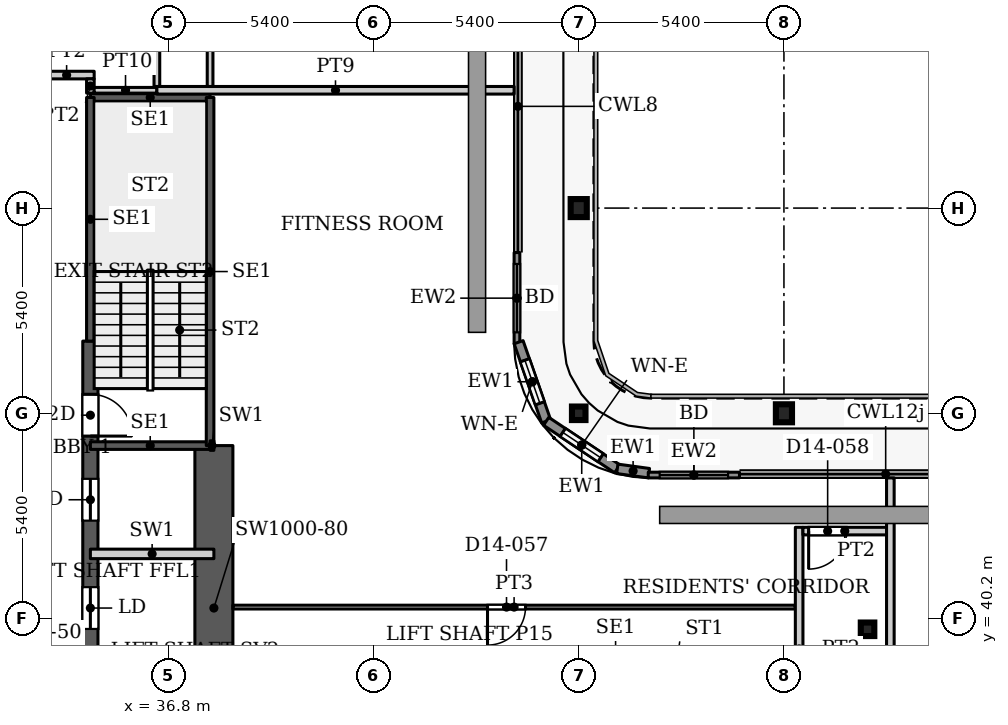
"""IFC4 building model, lengths in metres.
Left out: names, types, materials, properties, quantities, classifications, styles, units other than length and angle.
Written with IfcOpenShell. Run it as: python <this file> out.ifc"""

import sys

from ifc_helpers import new_model, si_unit, direction, frame, frame_2d, origin, origin_2d, place, context, subcontext, project, spatial, rectangle, hollow_rectangle, i_section, extrude, source, transform, mapped, element, fill, save


model = new_model("IFC4")
c1 = context("Model", 3, precision=1e-05, world=origin(), true_north=direction((0.0, 1.0)))
c2 = subcontext(c1, "Body", "Model", "MODEL_VIEW")
j1 = project(units=[si_unit("LENGTHUNIT", "METRE"), si_unit("PLANEANGLEUNIT", "RADIAN")], contexts=[c1])
p1 = place(None, origin())
s1 = spatial("IfcSite", under=j1, at=p1, CompositionType="ELEMENT")
p2 = place(p1, origin())
s2 = spatial("IfcBuilding", under=s1, at=p2, CompositionType="ELEMENT")
p3 = place(p2, frame((0.0, 0.0, 61.7)))
s3 = spatial("IfcBuildingStorey", under=s2, at=p3, CompositionType="ELEMENT", Elevation=61.7)
for number, where, z_axis, x_axis in (
    (1, (53.0, 45.6, 0.0), (0.0, 0.0, 1.0), (1.0, 0.0, 0.0)),
    (2, (47.6, 51.0, 0.0), (0.0, 0.0, 1.0), (1.0, 0.0, 0.0)),
):
    element("IfcColumn", number, at=place(p3, frame(where, z_axis=z_axis, x_axis=x_axis)), inside=s3, PredefinedType="COLUMN", context=c2, shape_type="SweptSolid", body=[
        extrude(i_section(OverallWidth=0.424, OverallDepth=0.474, WebThickness=0.048, FlangeThickness=0.077, FilletRadius=0.014, at=origin_2d()), origin(), (0.0, 0.0, 1.0), 3.9),
    ])
for number, where, z_axis, x_axis in (
    (3, (55.2, 39.916, 0.0), (0.0, 0.0, 1.0), (1.0, 0.0, 0.0)),
    (4, (47.6, 45.6, 0.0), (0.0, 0.0, 1.0), (1.0, 0.0, 0.0)),
):
    element("IfcColumn", number, at=place(p3, frame(where, z_axis=z_axis, x_axis=x_axis)), inside=s3, PredefinedType="COLUMN", context=c2, shape_type="SweptSolid", body=[
        extrude(hollow_rectangle(XDim=0.356, YDim=0.356, WallThickness=0.016, InnerFilletRadius=0.016, OuterFilletRadius=0.032, at=origin_2d()), origin(), (0.0, 0.0, 1.0), 3.9),
    ])
p4 = place(p3, frame((34.75, 29.05, 0.0), z_axis=(0.0, 0.0, 1.0), x_axis=(0.0, 1.0, 0.0)))
e5 = element("IfcWall", 5, at=p4, inside=s3, PredefinedType="SHEAR", context=c2, shape_type="SweptSolid", body=[
    extrude(rectangle(XDim=18.45, YDim=0.4, at=frame_2d((9.225, 0.0))), origin(), (0.0, 0.0, 1.0), 3.9),
])
p5 = place(p4, frame((8.025, 0.0, 0.0)))
e6 = element("IfcOpeningElement", 6, at=p5, cuts=e5, PredefinedType="OPENING", context=c2, shape_type="SweptSolid", body=[
    extrude(rectangle(XDim=1.1, YDim=2.2, at=frame_2d((0.55, 1.1))), frame((0.0, 0.21, 0.0), z_axis=(0.0, -1.0, 0.0), x_axis=(1.0, 0.0, 0.0)), (0.0, 0.0, 1.0), 0.42),
])
p6 = place(p4, frame((10.875, 0.0, 0.0)))
e7 = element("IfcOpeningElement", 7, at=p6, cuts=e5, PredefinedType="OPENING", context=c2, shape_type="SweptSolid", body=[
    extrude(rectangle(XDim=1.1, YDim=2.2, at=frame_2d((0.55, 1.1))), frame((0.0, 0.21, 0.0), z_axis=(0.0, -1.0, 0.0), x_axis=(1.0, 0.0, 0.0)), (0.0, 0.0, 1.0), 0.42),
])
p7 = place(p4, frame((13.725, 0.0, 0.0)))
e8 = element("IfcOpeningElement", 8, at=p7, cuts=e5, PredefinedType="OPENING", context=c2, shape_type="SweptSolid", body=[
    extrude(rectangle(XDim=1.1, YDim=2.2, at=frame_2d((0.55, 1.1))), frame((0.0, 0.21, 0.0), z_axis=(0.0, -1.0, 0.0), x_axis=(1.0, 0.0, 0.0)), (0.0, 0.0, 1.0), 0.42),
])
p8 = place(p4, frame((15.95, 0.0, 0.0)))
e9 = element("IfcOpeningElement", 9, at=p8, cuts=e5, PredefinedType="OPENING", context=c2, shape_type="SweptSolid", body=[
    extrude(rectangle(XDim=1.1, YDim=2.2, at=frame_2d((0.55, 1.1))), frame((0.0, 0.21, 0.0), z_axis=(0.0, -1.0, 0.0), x_axis=(1.0, 0.0, 0.0)), (0.0, 0.0, 1.0), 0.42),
])
p9 = place(p3, frame((38.0, 36.2, 0.0), z_axis=(0.0, 0.0, 1.0), x_axis=(0.0, 1.0, 0.0)))
e10 = element("IfcWall", 10, at=p9, inside=s3, PredefinedType="SHEAR", context=c2, shape_type="SweptSolid", body=[
    extrude(rectangle(XDim=8.55, YDim=1.0, at=frame_2d((4.275, 0.0))), origin(), (0.0, 0.0, 1.0), 3.9),
])
p10 = place(p3, frame((45.975, 49.83, 0.0), z_axis=(0.0, 0.0, 1.0), x_axis=(0.0, -1.0, 0.0)))
e11 = element("IfcWall", 11, at=p10, inside=s3, PredefinedType="SOLIDWALL", context=c2, shape_type="SweptSolid", body=[
    extrude(rectangle(XDim=2.4, YDim=0.15, at=frame_2d((1.2, 0.0))), origin(), (0.0, 0.0, 1.0), 3.75),
])
p11 = place(p10, frame((0.3, 0.0, 0.0)))
e12 = element("IfcOpeningElement", 12, at=p11, cuts=e11, PredefinedType="OPENING", context=c2, shape_type="SweptSolid", body=[
    extrude(rectangle(XDim=1.8, YDim=2.4, at=frame_2d((0.9, 1.2))), frame((0.0, 0.085, 0.0), z_axis=(0.0, -1.0, 0.0), x_axis=(1.0, 0.0, 0.0)), (0.0, 0.0, 1.0), 0.17),
])
p12 = place(p3, frame((46.018, 47.471, 0.0), z_axis=(0.0, 0.0, 1.0), x_axis=(0.328791208903, -0.944402637093, 0.0)))
e13 = element("IfcWall", 13, at=p12, inside=s3, PredefinedType="SOLIDWALL", context=c2, shape_type="SweptSolid", body=[
    extrude(rectangle(XDim=2.205, YDim=0.25, at=frame_2d((1.102, 0.0))), origin(), (0.0, 0.0, 1.0), 3.75),
])
p13 = place(p12, frame((0.503, 0.0, 0.6)))
e14 = element("IfcOpeningElement", 14, at=p13, cuts=e13, PredefinedType="OPENING", context=c2, shape_type="SweptSolid", body=[
    extrude(rectangle(XDim=1.2, YDim=2.1, at=frame_2d((0.6, 1.05))), frame((0.0, 0.135, 0.0), z_axis=(0.0, -1.0, 0.0), x_axis=(1.0, 0.0, 0.0)), (0.0, 0.0, 1.0), 0.27),
])
p14 = place(p3, frame((46.743, 45.389, 0.0), z_axis=(0.0, 0.0, 1.0), x_axis=(0.831449265529, -0.555600682912, 0.0)))
e15 = element("IfcWall", 15, at=p14, inside=s3, PredefinedType="SOLIDWALL", context=c2, shape_type="SweptSolid", body=[
    extrude(rectangle(XDim=2.251, YDim=0.25, at=frame_2d((1.126, 0.0))), origin(), (0.0, 0.0, 1.0), 3.75),
])
p15 = place(p14, frame((0.525, 0.0, 0.6)))
e16 = element("IfcOpeningElement", 16, at=p15, cuts=e15, PredefinedType="OPENING", context=c2, shape_type="SweptSolid", body=[
    extrude(rectangle(XDim=1.2, YDim=2.1, at=frame_2d((0.6, 1.05))), frame((0.0, 0.135, 0.0), z_axis=(0.0, -1.0, 0.0), x_axis=(1.0, 0.0, 0.0)), (0.0, 0.0, 1.0), 0.27),
])
p16 = place(p3, frame((48.615, 44.138, 0.0), z_axis=(0.0, 0.0, 1.0), x_axis=(0.990741504246, -0.135761819977, 0.0)))
e17 = element("IfcWall", 17, at=p16, inside=s3, PredefinedType="SOLIDWALL", context=c2, shape_type="SweptSolid", body=[
    extrude(rectangle(XDim=0.84, YDim=0.25, at=frame_2d((0.42, 0.0))), origin(), (0.0, 0.0, 1.0), 3.75),
])
p17 = place(p3, frame((49.43, 43.975, 0.0), z_axis=(0.0, 0.0, 1.0), x_axis=(1.0, 0.0, 0.0)))
e18 = element("IfcWall", 18, at=p17, inside=s3, PredefinedType="SOLIDWALL", context=c2, shape_type="SweptSolid", body=[
    extrude(rectangle(XDim=2.4, YDim=0.15, at=frame_2d((1.2, 0.0))), origin(), (0.0, 0.0, 1.0), 3.75),
])
p18 = place(p17, frame((0.3, 0.0, 0.0)))
e19 = element("IfcOpeningElement", 19, at=p18, cuts=e18, PredefinedType="OPENING", context=c2, shape_type="SweptSolid", body=[
    extrude(rectangle(XDim=1.8, YDim=2.4, at=frame_2d((0.9, 1.2))), frame((0.0, 0.085, 0.0), z_axis=(0.0, -1.0, 0.0), x_axis=(1.0, 0.0, 0.0)), (0.0, 0.0, 1.0), 0.17),
])
for number, where, z_axis, x_axis in (
    (20, (34.75, 44.75, 0.0), (0.0, 0.0, 1.0), (1.0, 0.0, 0.0)),
    (21, (34.75, 53.91, 0.0), (0.0, 0.0, 1.0), (1.0, 0.0, 0.0)),
):
    element("IfcWall", number, at=place(p3, frame(where, z_axis=z_axis, x_axis=x_axis)), inside=s3, PredefinedType="SHEAR", context=c2, shape_type="SweptSolid", body=[
        extrude(rectangle(XDim=3.15, YDim=0.2, at=frame_2d((1.575, 0.0))), origin(), (0.0, 0.0, 1.0), 3.9),
    ])
p19 = place(p3, frame((34.75, 47.5, 0.0), z_axis=(0.0, 0.0, 1.0), x_axis=(0.0, 1.0, 0.0)))
e22 = element("IfcWall", 22, at=p19, inside=s3, PredefinedType="SHEAR", context=c2, shape_type="SweptSolid", body=[
    extrude(rectangle(XDim=6.41, YDim=0.2, at=frame_2d((3.205, 0.0))), origin(), (0.0, 0.0, 1.0), 3.9),
])
p20 = place(p3, frame((37.9, 44.75, 0.0), z_axis=(0.0, 0.0, 1.0), x_axis=(0.0, 1.0, 0.0)))
e23 = element("IfcWall", 23, at=p20, inside=s3, PredefinedType="SHEAR", context=c2, shape_type="SweptSolid", body=[
    extrude(rectangle(XDim=9.16, YDim=0.2, at=frame_2d((4.58, 0.0))), origin(), (0.0, 0.0, 1.0), 3.9),
])
p21 = place(p3, frame((34.75, 41.9, 0.0), z_axis=(0.0, 0.0, 1.0), x_axis=(1.0, 0.0, 0.0)))
e24 = element("IfcWall", 24, at=p21, inside=s3, PredefinedType="PARTITIONING", context=c2, shape_type="SweptSolid", body=[
    extrude(rectangle(XDim=3.25, YDim=0.25, at=frame_2d((1.625, 0.0))), origin(), (0.0, 0.0, 1.0), 3.9),
])
p22 = place(p3, frame((37.9, 44.75, 0.0), z_axis=(0.0, 0.0, 1.0), x_axis=(1.0, 0.0, 0.0)))
e25 = element("IfcWall", 25, at=p22, inside=s3, PredefinedType="PARTITIONING", context=c2, shape_type="SweptSolid", body=[
    extrude(rectangle(XDim=0.1, YDim=0.25, at=frame_2d((0.05, 0.0))), origin(), (0.0, 0.0, 1.0), 3.9),
])
p23 = place(p3, frame((33.4, 54.5, 0.0), z_axis=(0.0, 0.0, 1.0), x_axis=(1.0, 0.0, 0.0)))
e26 = element("IfcWall", 26, at=p23, inside=s3, PredefinedType="PARTITIONING", context=c2, shape_type="SweptSolid", body=[
    extrude(rectangle(XDim=1.45, YDim=0.2, at=frame_2d((0.725, 0.0))), origin(), (0.0, 0.0, 1.0), 3.6),
])
p24 = place(p3, frame((34.75, 54.025, 0.0), z_axis=(0.0, 0.0, 1.0), x_axis=(0.0, 1.0, 0.0)))
e27 = element("IfcWall", 27, at=p24, inside=s3, PredefinedType="PARTITIONING", context=c2, shape_type="SweptSolid", body=[
    extrude(rectangle(XDim=0.375, YDim=0.2, at=frame_2d((0.188, 0.0))), origin(), (0.0, 0.0, 1.0), 3.6),
])
p25 = place(p3, frame((34.85, 54.1, 0.0), z_axis=(0.0, 0.0, 1.0), x_axis=(1.0, 0.0, 0.0)))
e28 = element("IfcWall", 28, at=p25, inside=s3, PredefinedType="PARTITIONING", context=c2, shape_type="SweptSolid", body=[
    extrude(rectangle(XDim=1.65, YDim=0.15, at=frame_2d((0.825, 0.0))), origin(), (0.0, 0.0, 1.0), 3.6),
])
p26 = place(p3, frame((36.5, 54.1, 0.0), z_axis=(0.0, 0.0, 1.0), x_axis=(1.0, 0.0, 0.0)))
e29 = element("IfcWall", 29, at=p26, inside=s3, PredefinedType="PARTITIONING", context=c2, shape_type="SweptSolid", body=[
    extrude(rectangle(XDim=9.4, YDim=0.2, at=frame_2d((4.7, 0.0))), origin(), (0.0, 0.0, 1.0), 3.6),
])
p27 = place(p3, frame((36.5, 54.2, 0.0), z_axis=(0.0, 0.0, 1.0), x_axis=(0.0, 1.0, 0.0)))
e30 = element("IfcWall", 30, at=p27, inside=s3, PredefinedType="PARTITIONING", context=c2, shape_type="SweptSolid", body=[
    extrude(rectangle(XDim=2.825, YDim=0.15, at=frame_2d((1.413, 0.0))), origin(), (0.0, 0.0, 1.0), 3.6),
])
p28 = place(p27, frame((1.0, 0.0, 0.0)))
e31 = element("IfcOpeningElement", 31, at=p28, cuts=e30, PredefinedType="OPENING", context=c2, shape_type="SweptSolid", body=[
    extrude(rectangle(XDim=0.8, YDim=2.1, at=frame_2d((0.4, 1.05))), frame((0.0, 0.085, 0.0), z_axis=(0.0, -1.0, 0.0), x_axis=(1.0, 0.0, 0.0)), (0.0, 0.0, 1.0), 0.17),
])
p29 = place(p3, frame((37.9, 54.2, 0.0), z_axis=(0.0, 0.0, 1.0), x_axis=(0.0, 1.0, 0.0)))
e32 = element("IfcWall", 32, at=p29, inside=s3, PredefinedType="PARTITIONING", context=c2, shape_type="SweptSolid", body=[
    extrude(rectangle(XDim=25.05, YDim=0.15, at=frame_2d((12.525, 0.0))), origin(), (0.0, 0.0, 1.0), 3.6),
])
p30 = place(p29, frame((5.6, 0.0, 0.0)))
e33 = element("IfcOpeningElement", 33, at=p30, cuts=e32, PredefinedType="OPENING", context=c2, shape_type="SweptSolid", body=[
    extrude(rectangle(XDim=0.9, YDim=2.1, at=frame_2d((0.45, 1.05))), frame((0.0, 0.085, 0.0), z_axis=(0.0, -1.0, 0.0), x_axis=(1.0, 0.0, 0.0)), (0.0, 0.0, 1.0), 0.17),
])
p31 = place(p29, frame((14.9, 0.0, 0.0)))
e34 = element("IfcOpeningElement", 34, at=p31, cuts=e32, PredefinedType="OPENING", context=c2, shape_type="SweptSolid", body=[
    extrude(rectangle(XDim=0.9, YDim=2.1, at=frame_2d((0.45, 1.05))), frame((0.0, 0.085, 0.0), z_axis=(0.0, -1.0, 0.0), x_axis=(1.0, 0.0, 0.0)), (0.0, 0.0, 1.0), 0.17),
])
p32 = place(p29, frame((18.65, 0.0, 0.0)))
e35 = element("IfcOpeningElement", 35, at=p32, cuts=e32, PredefinedType="OPENING", context=c2, shape_type="SweptSolid", body=[
    extrude(rectangle(XDim=0.9, YDim=2.1, at=frame_2d((0.45, 1.05))), frame((0.0, 0.085, 0.0), z_axis=(0.0, -1.0, 0.0), x_axis=(1.0, 0.0, 0.0)), (0.0, 0.0, 1.0), 0.17),
])
p33 = place(p29, frame((22.5, 0.0, 0.0)))
e36 = element("IfcOpeningElement", 36, at=p33, cuts=e32, PredefinedType="OPENING", context=c2, shape_type="SweptSolid", body=[
    extrude(rectangle(XDim=1.0, YDim=2.1, at=frame_2d((0.5, 1.05))), frame((0.0, 0.085, 0.0), z_axis=(0.0, -1.0, 0.0), x_axis=(1.0, 0.0, 0.0)), (0.0, 0.0, 1.0), 0.17),
])
p34 = place(p29, frame((1.2, 0.0, 0.0)))
e37 = element("IfcOpeningElement", 37, at=p34, cuts=e32, PredefinedType="OPENING", context=c2, shape_type="SweptSolid", body=[
    extrude(rectangle(XDim=1.6, YDim=2.1, at=frame_2d((0.8, 1.05))), frame((0.0, 0.085, 0.0), z_axis=(0.0, -1.0, 0.0), x_axis=(1.0, 0.0, 0.0)), (0.0, 0.0, 1.0), 0.17),
])
p35 = place(p29, frame((11.3, 0.0, 0.0)))
e38 = element("IfcOpeningElement", 38, at=p35, cuts=e32, PredefinedType="OPENING", context=c2, shape_type="SweptSolid", body=[
    extrude(rectangle(XDim=0.9, YDim=2.1, at=frame_2d((0.45, 1.05))), frame((0.0, 0.085, 0.0), z_axis=(0.0, -1.0, 0.0), x_axis=(1.0, 0.0, 0.0)), (0.0, 0.0, 1.0), 0.17),
])
p36 = place(p3, frame((38.499, 40.5, 0.0), z_axis=(0.0, 0.0, 1.0), x_axis=(1.0, 0.0, 0.0)))
e39 = element("IfcWall", 39, at=p36, inside=s3, PredefinedType="PARTITIONING", context=c2, shape_type="SweptSolid", body=[
    extrude(rectangle(XDim=14.801, YDim=0.1, at=frame_2d((7.4, 0.0))), origin(), (0.0, 0.0, 1.0), 3.6),
])
p37 = place(p36, frame((6.701, 0.0, 0.0)))
e40 = element("IfcOpeningElement", 40, at=p37, cuts=e39, PredefinedType="OPENING", context=c2, shape_type="SweptSolid", body=[
    extrude(rectangle(XDim=1.0, YDim=2.1, at=frame_2d((0.5, 1.05))), frame((0.0, 0.06, 0.0), z_axis=(0.0, -1.0, 0.0), x_axis=(1.0, 0.0, 0.0)), (0.0, 0.0, 1.0), 0.12),
])
p38 = place(p3, frame((53.4, 36.199, 0.0), z_axis=(0.0, 0.0, 1.0), x_axis=(0.0, 1.0, 0.0)))
e41 = element("IfcWall", 41, at=p38, inside=s3, PredefinedType="PARTITIONING", context=c2, shape_type="SweptSolid", body=[
    extrude(rectangle(XDim=6.401, YDim=0.2, at=frame_2d((3.201, 0.0))), origin(), (0.0, 0.0, 1.0), 3.6),
])
p39 = place(p3, frame((53.5, 42.5, 0.0), z_axis=(0.0, 0.0, 1.0), x_axis=(1.0, 0.0, 0.0)))
e42 = element("IfcWall", 42, at=p39, inside=s3, PredefinedType="PARTITIONING", context=c2, shape_type="SweptSolid", body=[
    extrude(rectangle(XDim=2.2, YDim=0.2, at=frame_2d((1.1, 0.0))), origin(), (0.0, 0.0, 1.0), 3.6),
])
p40 = place(p39, frame((0.15, 0.0, 0.0)))
e43 = element("IfcOpeningElement", 43, at=p40, cuts=e42, PredefinedType="OPENING", context=c2, shape_type="SweptSolid", body=[
    extrude(rectangle(XDim=1.0, YDim=2.1, at=frame_2d((0.5, 1.05))), frame((0.0, 0.11, 0.0), z_axis=(0.0, -1.0, 0.0), x_axis=(1.0, 0.0, 0.0)), (0.0, 0.0, 1.0), 0.22),
])
p41 = place(p3, frame((55.8, 30.4, 0.0), z_axis=(0.0, 0.0, 1.0), x_axis=(0.0, 1.0, 0.0)))
e44 = element("IfcWall", 44, at=p41, inside=s3, PredefinedType="PARTITIONING", context=c2, shape_type="SweptSolid", body=[
    extrude(rectangle(XDim=13.5, YDim=0.2, at=frame_2d((6.75, 0.0))), origin(), (0.0, 0.0, 1.0), 3.6),
])
m1 = source(origin(), c2, "Body", "SweptSolid", [
    extrude(rectangle(XDim=1.8, YDim=2.4, at=frame_2d((0.9, 1.2))), frame((0.0, 0.025, 0.0), z_axis=(0.0, -1.0, 0.0), x_axis=(1.0, 0.0, 0.0)), (0.0, 0.0, 1.0), 0.05),
])
p42 = place(p11, origin())
e45 = element("IfcDoor", 45, at=p42, inside=s3, OperationType="SLIDING_TO_LEFT", PredefinedType="DOOR", context=c2, shape_type="MappedRepresentation", body=[
    mapped(m1, transform((0.0, 0.0, 0.0), x_axis=(1.0, 0.0, 0.0), y_axis=(0.0, 1.0, 0.0), z_axis=(0.0, 0.0, 1.0), scale=1.0)),
])
fill(e12, e45)
m2 = source(origin(), c2, "Body", "SweptSolid", [
    extrude(rectangle(XDim=1.2, YDim=2.1, at=frame_2d((0.6, 1.05))), frame((0.0, 0.03, 0.0), z_axis=(0.0, -1.0, 0.0), x_axis=(1.0, 0.0, 0.0)), (0.0, 0.0, 1.0), 0.06),
])
p43 = place(p13, origin())
e46 = element("IfcWindow", 46, at=p43, inside=s3, PartitioningType="SINGLE_PANEL", PredefinedType="WINDOW", context=c2, shape_type="MappedRepresentation", body=[
    mapped(m2, transform((0.0, 0.0, 0.0), x_axis=(1.0, 0.0, 0.0), y_axis=(0.0, 1.0, 0.0), z_axis=(0.0, 0.0, 1.0), scale=1.0)),
])
fill(e14, e46)
p44 = place(p15, origin())
e47 = element("IfcWindow", 47, at=p44, inside=s3, PartitioningType="SINGLE_PANEL", PredefinedType="WINDOW", context=c2, shape_type="MappedRepresentation", body=[
    mapped(m2, transform((0.0, 0.0, 0.0), x_axis=(1.0, 0.0, 0.0), y_axis=(0.0, 1.0, 0.0), z_axis=(0.0, 0.0, 1.0), scale=1.0)),
])
fill(e16, e47)
p45 = place(p18, origin())
e48 = element("IfcDoor", 48, at=p45, inside=s3, OperationType="SLIDING_TO_LEFT", PredefinedType="DOOR", context=c2, shape_type="MappedRepresentation", body=[
    mapped(m1, transform((0.0, 0.0, 0.0), x_axis=(1.0, 0.0, 0.0), y_axis=(0.0, 1.0, 0.0), z_axis=(0.0, 0.0, 1.0), scale=1.0)),
])
fill(e19, e48)
m3 = source(origin(), c2, "Body", "SweptSolid", [
    extrude(rectangle(XDim=1.1, YDim=2.2, at=frame_2d((0.55, 1.1))), frame((0.0, 0.025, 0.0), z_axis=(0.0, -1.0, 0.0), x_axis=(1.0, 0.0, 0.0)), (0.0, 0.0, 1.0), 0.05),
])
p46 = place(p6, origin())
e49 = element("IfcDoor", 49, at=p46, inside=s3, OperationType="SLIDING_TO_LEFT", PredefinedType="DOOR", context=c2, shape_type="MappedRepresentation", body=[
    mapped(m3, transform((0.0, 0.0, 0.0), x_axis=(1.0, 0.0, 0.0), y_axis=(0.0, 1.0, 0.0), z_axis=(0.0, 0.0, 1.0), scale=1.0)),
])
fill(e7, e49)
p47 = place(p7, origin())
e50 = element("IfcDoor", 50, at=p47, inside=s3, OperationType="SLIDING_TO_LEFT", PredefinedType="DOOR", context=c2, shape_type="MappedRepresentation", body=[
    mapped(m3, transform((0.0, 0.0, 0.0), x_axis=(1.0, 0.0, 0.0), y_axis=(0.0, 1.0, 0.0), z_axis=(0.0, 0.0, 1.0), scale=1.0)),
])
fill(e8, e50)
m4 = source(origin(), c2, "Body", "SweptSolid", [
    extrude(rectangle(XDim=1.1, YDim=2.2, at=frame_2d((0.55, 1.1))), frame((0.0, 0.025, 0.0), z_axis=(0.0, -1.0, 0.0), x_axis=(1.0, 0.0, 0.0)), (0.0, 0.0, 1.0), 0.05),
])
p48 = place(p8, origin())
e51 = element("IfcDoor", 51, at=p48, inside=s3, OperationType="SINGLE_SWING_RIGHT", PredefinedType="DOOR", context=c2, shape_type="MappedRepresentation", body=[
    mapped(m4, transform((0.0, 0.0, 0.0), x_axis=(1.0, 0.0, 0.0), y_axis=(0.0, 1.0, 0.0), z_axis=(0.0, 0.0, 1.0), scale=1.0)),
])
fill(e9, e51)
m5 = source(origin(), c2, "Body", "SweptSolid", [
    extrude(rectangle(XDim=1.0, YDim=2.1, at=frame_2d((0.5, 1.05))), frame((0.0, 0.025, 0.0), z_axis=(0.0, -1.0, 0.0), x_axis=(1.0, 0.0, 0.0)), (0.0, 0.0, 1.0), 0.05),
])
p49 = place(p37, origin())
e52 = element("IfcDoor", 52, at=p49, inside=s3, OperationType="SINGLE_SWING_RIGHT", PredefinedType="DOOR", context=c2, shape_type="MappedRepresentation", body=[
    mapped(m5, transform((0.0, 0.0, 0.0), x_axis=(1.0, 0.0, 0.0), y_axis=(0.0, 1.0, 0.0), z_axis=(0.0, 0.0, 1.0), scale=1.0)),
])
fill(e40, e52)
m6 = source(origin(), c2, "Body", "SweptSolid", [
    extrude(rectangle(XDim=1.0, YDim=2.1, at=frame_2d((0.5, 1.05))), frame((0.0, 0.025, 0.0), z_axis=(0.0, -1.0, 0.0), x_axis=(1.0, 0.0, 0.0)), (0.0, 0.0, 1.0), 0.05),
])
p50 = place(p40, origin())
e53 = element("IfcDoor", 53, at=p50, inside=s3, OperationType="SINGLE_SWING_RIGHT", PredefinedType="DOOR", context=c2, shape_type="MappedRepresentation", body=[
    mapped(m6, transform((0.0, 0.0, 0.0), x_axis=(1.0, 0.0, 0.0), y_axis=(0.0, 1.0, 0.0), z_axis=(0.0, 0.0, 1.0), scale=1.0)),
])
fill(e43, e53)
save(model, sys.argv[1])
